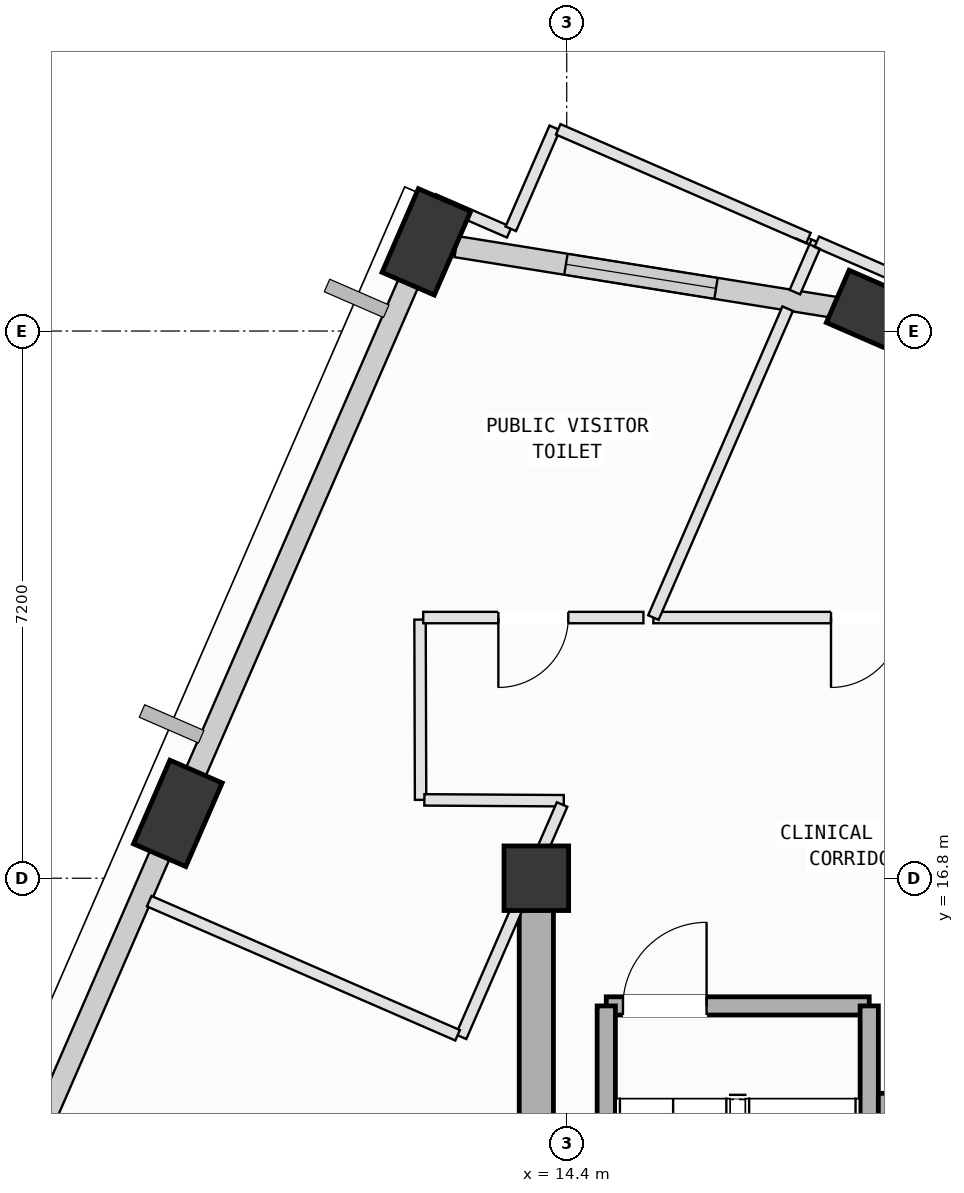
"""IFC4 building model, lengths in metres.
Left out: names, types, materials, properties, quantities, classifications, styles, units other than length and angle.
Written with IfcOpenShell. Run it as: python <this file> out.ifc"""

import sys

from ifc_helpers import new_model, si_unit, direction, frame, frame_2d, origin, origin_2d, place, context, subcontext, project, spatial, rectangle, extrude, element, fill, save


model = new_model("IFC4")
c1 = context("Model", 3, precision=1e-05, world=origin(), true_north=direction((0.0, 1.0)))
c2 = subcontext(c1, "Body", "Model", "MODEL_VIEW")
j1 = project(units=[si_unit("LENGTHUNIT", "METRE"), si_unit("PLANEANGLEUNIT", "RADIAN")], contexts=[c1])
p1 = place(None, origin())
s1 = spatial("IfcSite", under=j1, at=p1, CompositionType="ELEMENT")
p2 = place(p1, origin())
s2 = spatial("IfcBuilding", under=s1, at=p2, CompositionType="ELEMENT")
p3 = place(p2, frame((0.0, 0.0, 324.6)))
s3 = spatial("IfcBuildingStorey", under=s2, at=p3, CompositionType="ELEMENT", Elevation=324.6)
p4 = place(p3, frame((14.0, 16.8, 0.0), z_axis=(0.0, 0.0, 1.0), x_axis=(1.0, 0.0, 0.0)))
e1 = element("IfcColumn", 1, at=p4, inside=s3, PredefinedType="COLUMN", context=c2, shape_type="SweptSolid", body=[
    extrude(rectangle(XDim=0.85, YDim=0.85, at=origin_2d()), origin(), (0.0, 0.0, 1.0), 4.0),
])
for number, where, z_axis, x_axis in (
    (2, (18.516, 24.216, 0.002), (0.0, 0.0, 1.0), (-0.917, 0.399, 0.0)),
    (3, (12.553, 25.173, 0.002), (0.0, 0.0, 1.0), (0.399, 0.917, 0.0)),
    (4, (9.283, 17.654, 0.002), (0.0, 0.0, 1.0), (0.399, 0.917, 0.0)),
):
    element("IfcColumn", number, at=place(p3, frame(where, z_axis=z_axis, x_axis=x_axis)), inside=s3, PredefinedType="COLUMN", context=c2, shape_type="SweptSolid", body=[
        extrude(rectangle(XDim=1.2, YDim=0.75, at=origin_2d()), origin(), (0.0, 0.0, 1.0), 3.996),
    ])
p5 = place(p3, frame((12.946, 25.11, 0.0), z_axis=(0.0, 0.0, 1.0), x_axis=(0.987363821305, -0.158469821666, 0.0)))
e5 = element("IfcWall", 5, at=p5, inside=s3, PredefinedType="SOLIDWALL", context=c2, shape_type="SweptSolid", body=[
    extrude(rectangle(XDim=5.244, YDim=0.28, at=frame_2d((2.622, 0.0))), origin(), (0.0, 0.0, 1.0), 3.265),
])
p6 = place(p5, frame((1.462, 0.0, 0.75)))
e6 = element("IfcOpeningElement", 6, at=p6, cuts=e5, PredefinedType="OPENING", context=c2, shape_type="SweptSolid", body=[
    extrude(rectangle(XDim=2.0, YDim=1.95, at=frame_2d((1.0, 0.975))), frame((0.0, 0.15, 0.0), z_axis=(0.0, -1.0, 0.0), x_axis=(1.0, 0.0, 0.0)), (0.0, 0.0, 1.0), 0.3),
])
p7 = place(p3, frame((9.442, 18.018, 0.0), z_axis=(0.0, 0.0, 1.0), x_axis=(0.398768305896, 0.917051709672, 0.0)))
e7 = element("IfcWall", 7, at=p7, inside=s3, PredefinedType="SOLIDWALL", context=c2, shape_type="SweptSolid", body=[
    extrude(rectangle(XDim=7.405, YDim=0.28, at=frame_2d((3.703, 0.0))), origin(), (0.0, 0.0, 1.0), 3.265),
])
p8 = place(p3, frame((6.172, 10.498, 0.0), z_axis=(0.0, 0.0, 1.0), x_axis=(0.398740578379, 0.917063766133, 0.0)))
e8 = element("IfcWall", 8, at=p8, inside=s3, PredefinedType="SOLIDWALL", context=c2, shape_type="SweptSolid", body=[
    extrude(rectangle(XDim=7.405, YDim=0.28, at=frame_2d((3.702, 0.0))), origin(), (0.0, 0.0, 1.0), 3.265),
])
p9 = place(p3, frame((14.92, 15.12, 0.0), z_axis=(0.0, 0.0, 1.0), x_axis=(1.0, 0.0, 0.0)))
e9 = element("IfcWall", 9, at=p9, inside=s3, PredefinedType="SOLIDWALL", context=c2, shape_type="SweptSolid", body=[
    extrude(rectangle(XDim=3.46, YDim=0.24, at=frame_2d((1.73, 0.0))), origin(), (0.0, 0.0, 1.0), 3.78),
])
p10 = place(p9, frame((0.22, 0.0, 0.0)))
e10 = element("IfcOpeningElement", 10, at=p10, cuts=e9, PredefinedType="OPENING", context=c2, shape_type="SweptSolid", body=[
    extrude(rectangle(XDim=1.1, YDim=2.15, at=frame_2d((0.55, 1.075))), frame((0.0, 0.13, 0.0), z_axis=(0.0, -1.0, 0.0), x_axis=(1.0, 0.0, 0.0)), (0.0, 0.0, 1.0), 0.26),
])
for number, where, z_axis, x_axis in (
    (11, (18.38, 15.12, 0.0), (0.0, 0.0, 1.0), (0.0, -1.0, 0.0)),
    (12, (14.92, 8.025, 0.0), (0.0, 0.0, 1.0), (0.0, 1.0, 0.0)),
):
    element("IfcWall", number, at=place(p3, frame(where, z_axis=z_axis, x_axis=x_axis)), inside=s3, PredefinedType="SOLIDWALL", context=c2, shape_type="SweptSolid", body=[
        extrude(rectangle(XDim=7.095, YDim=0.24, at=frame_2d((3.548, 0.0))), origin(), (0.0, 0.0, 1.0), 3.78),
    ])
p11 = place(p3, frame((14.0, 16.8, 0.0), z_axis=(0.0, 0.0, 1.0), x_axis=(0.0, -1.0, 0.0)))
e13 = element("IfcWall", 13, at=p11, inside=s3, PredefinedType="SHEAR", context=c2, shape_type="SweptSolid", body=[
    extrude(rectangle(XDim=9.0, YDim=0.45, at=frame_2d((4.5, 0.0))), origin(), (0.0, 0.0, 1.0), 3.78),
])
p12 = place(p3, frame((18.5, 13.82, 0.0), z_axis=(0.0, 0.0, 1.0), x_axis=(1.0, 0.0, 0.0)))
e14 = element("IfcWall", 14, at=p12, inside=s3, PredefinedType="SOLIDWALL", context=c2, shape_type="SweptSolid", body=[
    extrude(rectangle(XDim=5.3, YDim=0.3, at=frame_2d((2.65, 0.0))), origin(), (0.0, 0.0, 1.0), 3.78),
])
p13 = place(p12, frame((0.18, 0.0, 0.0)))
e15 = element("IfcOpeningElement", 15, at=p13, cuts=e14, PredefinedType="OPENING", context=c2, shape_type="SweptSolid", body=[
    extrude(rectangle(XDim=1.1, YDim=2.15, at=frame_2d((0.55, 1.075))), frame((0.0, 0.16, 0.0), z_axis=(0.0, -1.0, 0.0), x_axis=(1.0, 0.0, 0.0)), (0.0, 0.0, 1.0), 0.32),
])
p14 = place(p3, frame((21.134, 20.23, 0.0), z_axis=(0.0, 0.0, 1.0), x_axis=(-1.0, 0.0, 0.0)))
e16 = element("IfcWall", 16, at=p14, inside=s3, PredefinedType="PARTITIONING", context=c2, shape_type="SweptSolid", body=[
    extrude(rectangle(XDim=5.594, YDim=0.15, at=frame_2d((2.797, 0.0))), origin(), (0.0, 0.0, 1.0), 3.415),
])
p15 = place(p14, frame((2.337, 0.0, 0.0)))
e17 = element("IfcOpeningElement", 17, at=p15, cuts=e16, PredefinedType="OPENING", context=c2, shape_type="SweptSolid", body=[
    extrude(rectangle(XDim=0.92, YDim=2.1, at=frame_2d((0.46, 1.05))), frame((0.0, 0.085, 0.0), z_axis=(0.0, -1.0, 0.0), x_axis=(1.0, 0.0, 0.0)), (0.0, 0.0, 1.0), 0.17),
])
p16 = place(p3, frame((15.54, 20.23, 0.0), z_axis=(0.0, 0.0, 1.0), x_axis=(0.398707980575, 0.917077939014, 0.0)))
e18 = element("IfcWall", 18, at=p16, inside=s3, PredefinedType="PARTITIONING", context=c2, shape_type="SweptSolid", body=[
    extrude(rectangle(XDim=4.431, YDim=0.15, at=frame_2d((2.216, 0.0))), origin(), (0.0, 0.0, 1.0), 2.765),
])
p17 = place(p3, frame((17.402, 24.512, 0.0), z_axis=(0.0, 0.0, 1.0), x_axis=(0.398195004061, 0.917300789677, 0.0)))
e19 = element("IfcWall", 19, at=p17, inside=s3, PredefinedType="PARTITIONING", context=c2, shape_type="SweptSolid", body=[
    extrude(rectangle(XDim=0.723, YDim=0.15, at=frame_2d((0.361, 0.0))), origin(), (0.0, 0.0, 1.0), 3.78),
])
p18 = place(p3, frame((17.69, 25.175, 0.0), z_axis=(0.0, 0.0, 1.0), x_axis=(0.917107123666, -0.398640845525, 0.0)))
e20 = element("IfcWall", 20, at=p18, inside=s3, PredefinedType="PARTITIONING", context=c2, shape_type="SweptSolid", body=[
    extrude(rectangle(XDim=5.13, YDim=0.15, at=frame_2d((2.565, 0.0))), origin(), (0.0, 0.0, 1.0), 3.78),
])
p19 = place(p3, frame((12.47, 20.203, 0.0), z_axis=(0.0, 0.0, 1.0), x_axis=(0.002985061327, -0.999995544695, 0.0)))
e21 = element("IfcWall", 21, at=p19, inside=s3, PredefinedType="PARTITIONING", context=c2, shape_type="SweptSolid", body=[
    extrude(rectangle(XDim=2.372, YDim=0.15, at=frame_2d((1.186, 0.0))), origin(), (0.0, 0.0, 1.0), 3.78),
])
p20 = place(p3, frame((12.527, 17.831, 0.0), z_axis=(0.0, 0.0, 1.0), x_axis=(0.999982057945, -0.005990307855, 0.0)))
e22 = element("IfcWall", 22, at=p20, inside=s3, PredefinedType="PARTITIONING", context=c2, shape_type="SweptSolid", body=[
    extrude(rectangle(XDim=1.834, YDim=0.15, at=frame_2d((0.917, 0.0))), origin(), (0.0, 0.0, 1.0), 3.78),
])
p21 = place(p3, frame((14.339, 17.77, 0.0), z_axis=(0.0, 0.0, 1.0), x_axis=(-0.399140640041, -0.916889714997, 0.0)))
e23 = element("IfcWall", 23, at=p21, inside=s3, PredefinedType="PARTITIONING", context=c2, shape_type="SweptSolid", body=[
    extrude(rectangle(XDim=0.84, YDim=0.15, at=frame_2d((0.42, 0.0))), origin(), (0.0, 0.0, 1.0), 2.765),
])
p22 = place(p3, frame((13.8, 16.53, 0.0), z_axis=(0.0, 0.0, 1.0), x_axis=(-0.398942481852, -0.916975951797, 0.0)))
e24 = element("IfcWall", 24, at=p22, inside=s3, PredefinedType="PARTITIONING", context=c2, shape_type="SweptSolid", body=[
    extrude(rectangle(XDim=1.98, YDim=0.15, at=frame_2d((0.99, 0.0))), origin(), (0.0, 0.0, 1.0), 2.765),
])
p23 = place(p3, frame((12.964, 14.734, 0.0), z_axis=(0.0, 0.0, 1.0), x_axis=(-0.917054263497, 0.398762432786, 0.0)))
e25 = element("IfcWall", 25, at=p23, inside=s3, PredefinedType="PARTITIONING", context=c2, shape_type="SweptSolid", body=[
    extrude(rectangle(XDim=4.424, YDim=0.15, at=frame_2d((2.212, 0.0))), origin(), (0.0, 0.0, 1.0), 3.78),
])
p24 = place(p3, frame((8.951, 17.365, 0.0), z_axis=(0.0, 0.0, 1.0), x_axis=(0.398916999953, 0.916987037612, 0.0)))
e26 = element("IfcWall", 26, at=p24, inside=s3, PredefinedType="PARTITIONING", context=c2, shape_type="SweptSolid", body=[
    extrude(rectangle(XDim=0.795, YDim=0.15, at=frame_2d((0.397, 0.0))), origin(), (0.0, 0.0, 1.0), 3.265),
])
p25 = place(p3, frame((12.22, 24.885, 0.0), z_axis=(0.0, 0.0, 1.0), x_axis=(0.399235297463, 0.916848502894, 0.0)))
e27 = element("IfcWall", 27, at=p25, inside=s3, PredefinedType="PARTITIONING", context=c2, shape_type="SweptSolid", body=[
    extrude(rectangle(XDim=0.947, YDim=0.15, at=frame_2d((0.473, 0.0))), origin(), (0.0, 0.0, 1.0), 3.265),
])
p26 = place(p3, frame((12.644, 25.733, 0.0), z_axis=(0.0, 0.0, 1.0), x_axis=(0.9173866736, -0.397997099362, 0.0)))
e28 = element("IfcWall", 28, at=p26, inside=s3, PredefinedType="PARTITIONING", context=c2, shape_type="SweptSolid", body=[
    extrude(rectangle(XDim=1.09, YDim=0.15, at=frame_2d((0.545, 0.0))), origin(), (0.0, 0.0, 1.0), 3.265),
])
p27 = place(p3, frame((13.664, 25.345, 0.0), z_axis=(0.0, 0.0, 1.0), x_axis=(0.398732271116, 0.917067378097, 0.0)))
e29 = element("IfcWall", 29, at=p27, inside=s3, PredefinedType="PARTITIONING", context=c2, shape_type="SweptSolid", body=[
    extrude(rectangle(XDim=1.449, YDim=0.15, at=frame_2d((0.725, 0.0))), origin(), (0.0, 0.0, 1.0), 3.78),
])
p28 = place(p3, frame((14.288, 26.654, 0.0), z_axis=(0.0, 0.0, 1.0), x_axis=(0.917085193586, -0.398691293741, 0.0)))
e30 = element("IfcWall", 30, at=p28, inside=s3, PredefinedType="PARTITIONING", context=c2, shape_type="SweptSolid", body=[
    extrude(rectangle(XDim=3.59, YDim=0.15, at=frame_2d((1.795, 0.0))), origin(), (0.0, 0.0, 1.0), 3.78),
])
p29 = place(p3, frame((15.409, 20.23, 0.0), z_axis=(0.0, 0.0, 1.0), x_axis=(-1.0, 0.0, 0.0)))
e31 = element("IfcWall", 31, at=p29, inside=s3, PredefinedType="PARTITIONING", context=c2, shape_type="SweptSolid", body=[
    extrude(rectangle(XDim=2.897, YDim=0.15, at=frame_2d((1.448, 0.0))), origin(), (0.0, 0.0, 1.0), 3.415),
])
p30 = place(p29, frame((0.989, 0.0, 0.0)))
e32 = element("IfcOpeningElement", 32, at=p30, cuts=e31, PredefinedType="OPENING", context=c2, shape_type="SweptSolid", body=[
    extrude(rectangle(XDim=0.92, YDim=2.1, at=frame_2d((0.46, 1.05))), frame((0.0, 0.085, 0.0), z_axis=(0.0, -1.0, 0.0), x_axis=(1.0, 0.0, 0.0)), (0.0, 0.0, 1.0), 0.17),
])
p31 = place(p6, origin())
e33 = element("IfcWindow", 33, at=p31, inside=s3, PartitioningType="SINGLE_PANEL", PredefinedType="WINDOW", context=c2, shape_type="SweptSolid", body=[
    extrude(rectangle(XDim=2.0, YDim=1.95, at=frame_2d((1.0, 0.975))), frame((0.0, 0.03, 0.0), z_axis=(0.0, -1.0, 0.0), x_axis=(1.0, 0.0, 0.0)), (0.0, 0.0, 1.0), 0.06),
])
fill(e6, e33)
p32 = place(p10, origin())
e34 = element("IfcDoor", 34, at=p32, inside=s3, OperationType="SINGLE_SWING_RIGHT", PredefinedType="DOOR", context=c2, shape_type="SweptSolid", body=[
    extrude(rectangle(XDim=1.1, YDim=2.15, at=frame_2d((0.55, 1.075))), frame((0.0, 0.025, 0.0), z_axis=(0.0, -1.0, 0.0), x_axis=(1.0, 0.0, 0.0)), (0.0, 0.0, 1.0), 0.05),
])
fill(e10, e34)
p33 = place(p15, origin())
e35 = element("IfcDoor", 35, at=p33, inside=s3, OperationType="SINGLE_SWING_RIGHT", PredefinedType="DOOR", context=c2, shape_type="SweptSolid", body=[
    extrude(rectangle(XDim=0.92, YDim=2.1, at=frame_2d((0.46, 1.05))), frame((0.0, 0.025, 0.0), z_axis=(0.0, -1.0, 0.0), x_axis=(1.0, 0.0, 0.0)), (0.0, 0.0, 1.0), 0.05),
])
fill(e17, e35)
p34 = place(p30, origin())
e36 = element("IfcDoor", 36, at=p34, inside=s3, OperationType="SINGLE_SWING_RIGHT", PredefinedType="DOOR", context=c2, shape_type="SweptSolid", body=[
    extrude(rectangle(XDim=0.92, YDim=2.1, at=frame_2d((0.46, 1.05))), frame((0.0, 0.025, 0.0), z_axis=(0.0, -1.0, 0.0), x_axis=(1.0, 0.0, 0.0)), (0.0, 0.0, 1.0), 0.05),
])
fill(e32, e36)
save(model, sys.argv[1])
